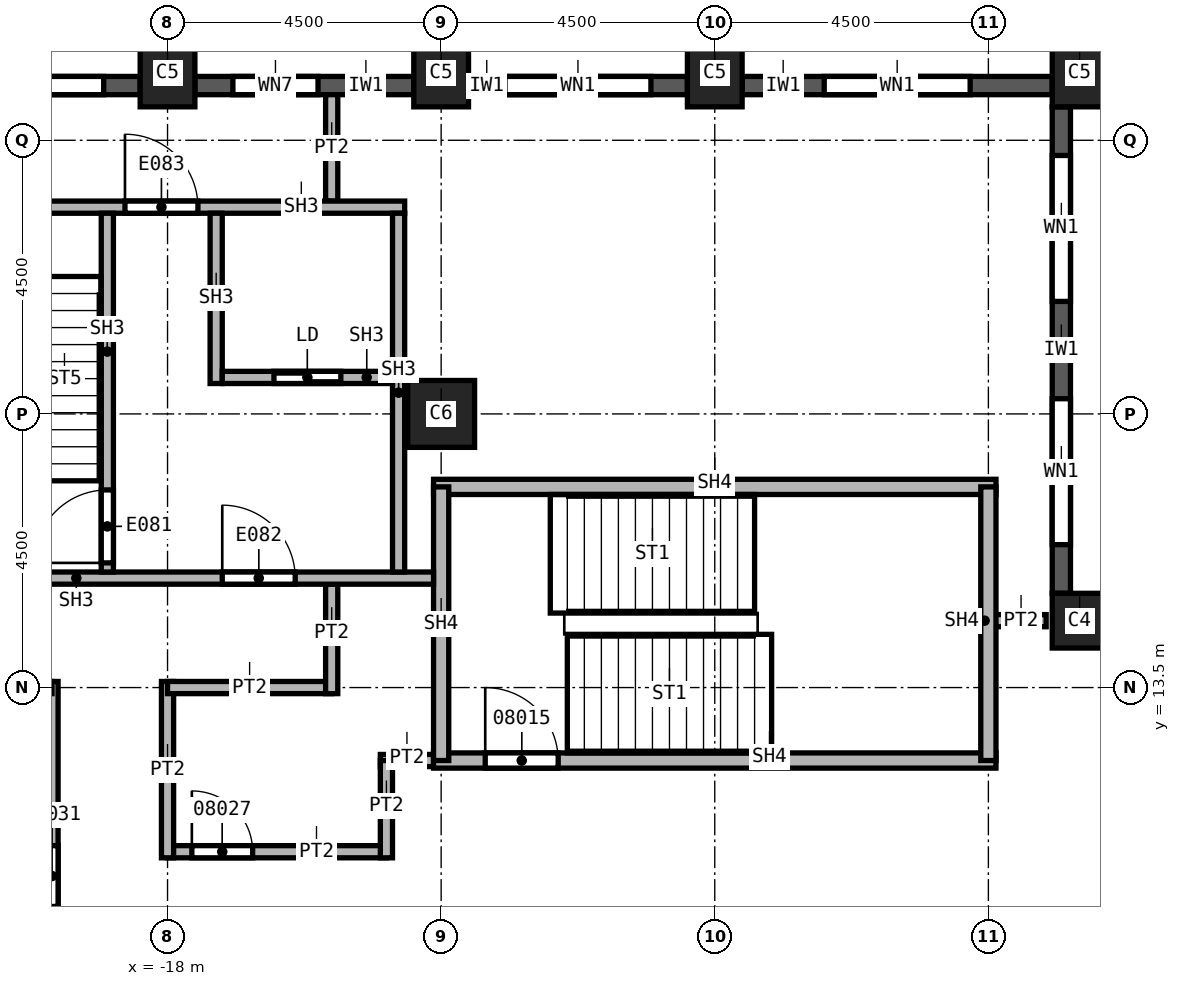
"""IFC4 building model, lengths in metres.
Left out: names, types, materials, properties, quantities, classifications, styles, units other than length and angle.
Written with IfcOpenShell. Run it as: python <this file> out.ifc"""

import sys

from ifc_helpers import new_model, si_unit, direction, frame, frame_2d, origin, origin_2d, place, context, subcontext, project, spatial, rectangle, extrude, element, fill, save


model = new_model("IFC4")
c1 = context("Model", 3, precision=1e-05, world=origin(), true_north=direction((0.0, 1.0)))
c2 = subcontext(c1, "Body", "Model", "MODEL_VIEW")
j1 = project(units=[si_unit("LENGTHUNIT", "METRE"), si_unit("PLANEANGLEUNIT", "RADIAN")], contexts=[c1])
p1 = place(None, origin())
s1 = spatial("IfcSite", under=j1, at=p1, CompositionType="ELEMENT")
p2 = place(p1, origin())
s2 = spatial("IfcBuilding", under=s1, at=p2, CompositionType="ELEMENT")
p3 = place(p2, frame((0.0, 0.0, 150.0)))
s3 = spatial("IfcBuildingStorey", under=s2, at=p3, CompositionType="ELEMENT", Elevation=150.0)
p4 = place(p3, frame((-13.5, 18.0, 0.0), z_axis=(0.0, 0.0, 1.0), x_axis=(1.0, 0.0, 0.0)))
e1 = element("IfcColumn", 1, at=p4, inside=s3, PredefinedType="COLUMN", context=c2, shape_type="SweptSolid", body=[
    extrude(rectangle(XDim=1.1, YDim=1.1, at=origin_2d()), origin(), (0.0, 0.0, 1.0), 3.7),
])
for number, where, z_axis, x_axis in (
    (2, (-3.0, 23.6, 0.0), (0.0, 0.0, 1.0), (1.0, 0.0, 0.0)),
    (3, (-9.0, 23.6, 0.0), (0.0, 0.0, 1.0), (1.0, 0.0, 0.0)),
    (4, (-13.5, 23.6, 0.0), (0.0, 0.0, 1.0), (1.0, 0.0, 0.0)),
    (5, (-18.0, 23.6, 0.0), (0.0, 0.0, 1.0), (1.0, 0.0, 0.0)),
):
    element("IfcColumn", number, at=place(p3, frame(where, z_axis=z_axis, x_axis=x_axis)), inside=s3, PredefinedType="COLUMN", context=c2, shape_type="SweptSolid", body=[
        extrude(rectangle(XDim=0.9, YDim=1.1, at=origin_2d()), origin(), (0.0, 0.0, 1.0), 3.7),
    ])
p5 = place(p3, frame((-3.0, 14.6, 0.0), z_axis=(0.0, 0.0, 1.0), x_axis=(1.0, 0.0, 0.0)))
e6 = element("IfcColumn", 6, at=p5, inside=s3, PredefinedType="COLUMN", context=c2, shape_type="SweptSolid", body=[
    extrude(rectangle(XDim=0.9, YDim=0.9, at=origin_2d()), origin(), (0.0, 0.0, 1.0), 3.7),
])
p6 = place(p3, frame((-3.3, 15.05, 0.0), z_axis=(0.0, 0.0, 1.0), x_axis=(0.0, 1.0, 0.0)))
e7 = element("IfcWall", 7, at=p6, inside=s3, PredefinedType="SOLIDWALL", context=c2, shape_type="SweptSolid", body=[
    extrude(rectangle(XDim=8.0, YDim=0.3, at=frame_2d((4.0, 0.0))), origin(), (0.0, 0.0, 1.0), 3.1),
])
p7 = place(p6, frame((0.8, 0.0, 0.8)))
e8 = element("IfcOpeningElement", 8, at=p7, cuts=e7, PredefinedType="OPENING", context=c2, shape_type="SweptSolid", body=[
    extrude(rectangle(XDim=2.4, YDim=1.95, at=frame_2d((1.2, 0.975))), frame((0.0, 0.15, 0.0), z_axis=(0.0, -1.0, 0.0), x_axis=(1.0, 0.0, 0.0)), (0.0, 0.0, 1.0), 0.3),
])
p8 = place(p6, frame((4.8, 0.0, 0.8)))
e9 = element("IfcOpeningElement", 9, at=p8, cuts=e7, PredefinedType="OPENING", context=c2, shape_type="SweptSolid", body=[
    extrude(rectangle(XDim=2.4, YDim=1.95, at=frame_2d((1.2, 0.975))), frame((0.0, 0.15, 0.0), z_axis=(0.0, -1.0, 0.0), x_axis=(1.0, 0.0, 0.0)), (0.0, 0.0, 1.0), 0.3),
])
p9 = place(p3, frame((-3.45, 23.4, 0.0), z_axis=(0.0, 0.0, 1.0), x_axis=(-1.0, 0.0, 0.0)))
e10 = element("IfcWall", 10, at=p9, inside=s3, PredefinedType="SOLIDWALL", context=c2, shape_type="SweptSolid", body=[
    extrude(rectangle(XDim=5.1, YDim=0.3, at=frame_2d((2.55, 0.0))), origin(), (0.0, 0.0, 1.0), 3.1),
])
p10 = place(p9, frame((1.35, 0.0, 0.8)))
e11 = element("IfcOpeningElement", 11, at=p10, cuts=e10, PredefinedType="OPENING", context=c2, shape_type="SweptSolid", body=[
    extrude(rectangle(XDim=2.4, YDim=1.95, at=frame_2d((1.2, 0.975))), frame((0.0, 0.15, 0.0), z_axis=(0.0, -1.0, 0.0), x_axis=(1.0, 0.0, 0.0)), (0.0, 0.0, 1.0), 0.3),
])
p11 = place(p3, frame((-9.45, 23.4, 0.0), z_axis=(0.0, 0.0, 1.0), x_axis=(-1.0, 0.0, 0.0)))
e12 = element("IfcWall", 12, at=p11, inside=s3, PredefinedType="SOLIDWALL", context=c2, shape_type="SweptSolid", body=[
    extrude(rectangle(XDim=3.6, YDim=0.3, at=frame_2d((1.8, 0.0))), origin(), (0.0, 0.0, 1.0), 3.1),
])
p12 = place(p11, frame((0.6, 0.0, 0.8)))
e13 = element("IfcOpeningElement", 13, at=p12, cuts=e12, PredefinedType="OPENING", context=c2, shape_type="SweptSolid", body=[
    extrude(rectangle(XDim=2.4, YDim=1.95, at=frame_2d((1.2, 0.975))), frame((0.0, 0.15, 0.0), z_axis=(0.0, -1.0, 0.0), x_axis=(1.0, 0.0, 0.0)), (0.0, 0.0, 1.0), 0.3),
])
p13 = place(p3, frame((-13.95, 23.4, 0.0), z_axis=(0.0, 0.0, 1.0), x_axis=(-1.0, 0.0, 0.0)))
e14 = element("IfcWall", 14, at=p13, inside=s3, PredefinedType="SOLIDWALL", context=c2, shape_type="SweptSolid", body=[
    extrude(rectangle(XDim=3.6, YDim=0.3, at=frame_2d((1.8, 0.0))), origin(), (0.0, 0.0, 1.0), 3.1),
])
p14 = place(p13, frame((1.575, 0.0, 0.8)))
e15 = element("IfcOpeningElement", 15, at=p14, cuts=e14, PredefinedType="OPENING", context=c2, shape_type="SweptSolid", body=[
    extrude(rectangle(XDim=1.4, YDim=1.95, at=frame_2d((0.7, 0.975))), frame((0.0, 0.15, 0.0), z_axis=(0.0, -1.0, 0.0), x_axis=(1.0, 0.0, 0.0)), (0.0, 0.0, 1.0), 0.3),
])
p15 = place(p3, frame((-18.45, 23.4, 0.0), z_axis=(0.0, 0.0, 1.0), x_axis=(-1.0, 0.0, 0.0)))
e16 = element("IfcWall", 16, at=p15, inside=s3, PredefinedType="SOLIDWALL", context=c2, shape_type="SweptSolid", body=[
    extrude(rectangle(XDim=3.6, YDim=0.3, at=frame_2d((1.8, 0.0))), origin(), (0.0, 0.0, 1.0), 3.1),
])
p16 = place(p15, frame((0.6, 0.0, 0.8)))
e17 = element("IfcOpeningElement", 17, at=p16, cuts=e16, PredefinedType="OPENING", context=c2, shape_type="SweptSolid", body=[
    extrude(rectangle(XDim=2.4, YDim=1.95, at=frame_2d((1.2, 0.975))), frame((0.0, 0.15, 0.0), z_axis=(0.0, -1.0, 0.0), x_axis=(1.0, 0.0, 0.0)), (0.0, 0.0, 1.0), 0.3),
])
p17 = place(p3, frame((-19.9, 3.65, 0.0), z_axis=(0.0, 0.0, 1.0), x_axis=(0.0, 1.0, 0.0)))
e18 = element("IfcWall", 18, at=p17, inside=s3, PredefinedType="PARTITIONING", context=c2, shape_type="SweptSolid", body=[
    extrude(rectangle(XDim=9.95, YDim=0.2, at=frame_2d((4.975, 0.0))), origin(), (0.0, 0.0, 1.0), 3.7),
])
p18 = place(p17, frame((6.25, 0.0, 0.0)))
e19 = element("IfcOpeningElement", 19, at=p18, cuts=e18, PredefinedType="OPENING", context=c2, shape_type="SweptSolid", body=[
    extrude(rectangle(XDim=1.0, YDim=2.1, at=frame_2d((0.5, 1.05))), frame((0.0, 0.1, 0.0), z_axis=(0.0, -1.0, 0.0), x_axis=(1.0, 0.0, 0.0)), (0.0, 0.0, 1.0), 0.2),
])
p19 = place(p3, frame((-18.0, 10.8, 0.0), z_axis=(0.0, 0.0, 1.0), x_axis=(1.0, 0.0, 0.0)))
e20 = element("IfcWall", 20, at=p19, inside=s3, PredefinedType="PARTITIONING", context=c2, shape_type="SweptSolid", body=[
    extrude(rectangle(XDim=3.6, YDim=0.2, at=frame_2d((1.8, 0.0))), origin(), (0.0, 0.0, 1.0), 3.7),
])
p20 = place(p19, frame((0.4, 0.0, 0.0)))
e21 = element("IfcOpeningElement", 21, at=p20, cuts=e20, PredefinedType="OPENING", context=c2, shape_type="SweptSolid", body=[
    extrude(rectangle(XDim=1.0, YDim=2.1, at=frame_2d((0.5, 1.05))), frame((0.0, 0.1, 0.0), z_axis=(0.0, -1.0, 0.0), x_axis=(1.0, 0.0, 0.0)), (0.0, 0.0, 1.0), 0.2),
])
p21 = place(p3, frame((-18.0, 13.6, 0.0), z_axis=(0.0, 0.0, 1.0), x_axis=(0.0, -1.0, 0.0)))
e22 = element("IfcWall", 22, at=p21, inside=s3, PredefinedType="PARTITIONING", context=c2, shape_type="SweptSolid", body=[
    extrude(rectangle(XDim=2.9, YDim=0.2, at=frame_2d((1.45, 0.0))), origin(), (0.0, 0.0, 1.0), 3.7),
])
p22 = place(p3, frame((-15.3, 13.5, 0.0), z_axis=(0.0, 0.0, 1.0), x_axis=(-1.0, 0.0, 0.0)))
e23 = element("IfcWall", 23, at=p22, inside=s3, PredefinedType="PARTITIONING", context=c2, shape_type="SweptSolid", body=[
    extrude(rectangle(XDim=2.7, YDim=0.2, at=frame_2d((1.35, 0.0))), origin(), (0.0, 0.0, 1.0), 3.7),
])
p23 = place(p3, frame((-15.3, 15.2, 0.0), z_axis=(0.0, 0.0, 1.0), x_axis=(0.0, -1.0, 0.0)))
e24 = element("IfcWall", 24, at=p23, inside=s3, PredefinedType="PARTITIONING", context=c2, shape_type="SweptSolid", body=[
    extrude(rectangle(XDim=1.8, YDim=0.2, at=frame_2d((0.9, 0.0))), origin(), (0.0, 0.0, 1.0), 3.7),
])
p24 = place(p3, frame((-15.3, 23.25, 0.0), z_axis=(0.0, 0.0, 1.0), x_axis=(0.0, -1.0, 0.0)))
e25 = element("IfcWall", 25, at=p24, inside=s3, PredefinedType="PARTITIONING", context=c2, shape_type="SweptSolid", body=[
    extrude(rectangle(XDim=1.75, YDim=0.2, at=frame_2d((0.875, 0.0))), origin(), (0.0, 0.0, 1.0), 3.7),
])
p25 = place(p3, frame((-14.5, 12.3, 0.0), z_axis=(0.0, 0.0, 1.0), x_axis=(1.0, 0.0, 0.0)))
e26 = element("IfcWall", 26, at=p25, inside=s3, PredefinedType="PARTITIONING", context=c2, shape_type="SweptSolid", body=[
    extrude(rectangle(XDim=1.125, YDim=0.2, at=frame_2d((0.562, 0.0))), origin(), (0.0, 0.0, 1.0), 3.7),
])
p26 = place(p3, frame((-14.4, 10.7, 0.0), z_axis=(0.0, 0.0, 1.0), x_axis=(0.0, 1.0, 0.0)))
e27 = element("IfcWall", 27, at=p26, inside=s3, PredefinedType="PARTITIONING", context=c2, shape_type="SweptSolid", body=[
    extrude(rectangle(XDim=1.6, YDim=0.2, at=frame_2d((0.8, 0.0))), origin(), (0.0, 0.0, 1.0), 3.7),
])
p27 = place(p3, frame((-4.5, 14.6, 0.0), z_axis=(0.0, 0.0, 1.0), x_axis=(1.0, 0.0, 0.0)))
e28 = element("IfcWall", 28, at=p27, inside=s3, PredefinedType="PARTITIONING", context=c2, shape_type="SweptSolid", body=[
    extrude(rectangle(XDim=0.95, YDim=0.2, at=frame_2d((0.475, 0.0))), origin(), (0.0, 0.0, 1.0), 3.7),
])
p28 = place(p3, frame((-13.625, 12.3, 0.0), z_axis=(0.0, 0.0, 1.0), x_axis=(1.0, 0.0, 0.0)))
e29 = element("IfcWall", 29, at=p28, inside=s3, PredefinedType="SOLIDWALL", context=c2, shape_type="SweptSolid", body=[
    extrude(rectangle(XDim=9.25, YDim=0.25, at=frame_2d((4.625, 0.0))), origin(), (0.0, 0.0, 1.0), 3.7),
])
p29 = place(p28, frame((0.85, 0.0, 0.0)))
e30 = element("IfcOpeningElement", 30, at=p29, cuts=e29, PredefinedType="OPENING", context=c2, shape_type="SweptSolid", body=[
    extrude(rectangle(XDim=1.2, YDim=2.1, at=frame_2d((0.6, 1.05))), frame((0.0, 0.125, 0.0), z_axis=(0.0, -1.0, 0.0), x_axis=(1.0, 0.0, 0.0)), (0.0, 0.0, 1.0), 0.25),
])
p30 = place(p3, frame((-13.625, 16.8, 0.0), z_axis=(0.0, 0.0, 1.0), x_axis=(1.0, 0.0, 0.0)))
e31 = element("IfcWall", 31, at=p30, inside=s3, PredefinedType="SOLIDWALL", context=c2, shape_type="SweptSolid", body=[
    extrude(rectangle(XDim=9.25, YDim=0.25, at=frame_2d((4.625, 0.0))), origin(), (0.0, 0.0, 1.0), 3.7),
])
for number, where, z_axis, x_axis in (
    (32, (-13.5, 12.3, 0.0), (0.0, 0.0, 1.0), (0.0, 1.0, 0.0)),
    (33, (-4.5, 16.8, 0.0), (0.0, 0.0, 1.0), (0.0, -1.0, 0.0)),
):
    element("IfcWall", number, at=place(p3, frame(where, z_axis=z_axis, x_axis=x_axis)), inside=s3, PredefinedType="SOLIDWALL", context=c2, shape_type="SweptSolid", body=[
        extrude(rectangle(XDim=4.5, YDim=0.25, at=frame_2d((2.25, 0.0))), origin(), (0.0, 0.0, 1.0), 3.7),
    ])
p31 = place(p3, frame((-21.9, 15.3, 0.0), z_axis=(0.0, 0.0, 1.0), x_axis=(1.0, 0.0, 0.0)))
e34 = element("IfcWall", 34, at=p31, inside=s3, PredefinedType="SOLIDWALL", context=c2, shape_type="SweptSolid", body=[
    extrude(rectangle(XDim=8.275, YDim=0.2, at=frame_2d((4.137, 0.0))), origin(), (0.0, 0.0, 1.0), 3.7),
])
p32 = place(p31, frame((4.8, 0.0, 0.0)))
e35 = element("IfcOpeningElement", 35, at=p32, cuts=e34, PredefinedType="OPENING", context=c2, shape_type="SweptSolid", body=[
    extrude(rectangle(XDim=1.2, YDim=2.1, at=frame_2d((0.6, 1.05))), frame((0.0, 0.1, 0.0), z_axis=(0.0, -1.0, 0.0), x_axis=(1.0, 0.0, 0.0)), (0.0, 0.0, 1.0), 0.2),
])
p33 = place(p3, frame((-21.9, 21.4, 0.0), z_axis=(0.0, 0.0, 1.0), x_axis=(1.0, 0.0, 0.0)))
e36 = element("IfcWall", 36, at=p33, inside=s3, PredefinedType="SOLIDWALL", context=c2, shape_type="SweptSolid", body=[
    extrude(rectangle(XDim=7.8, YDim=0.2, at=frame_2d((3.9, 0.0))), origin(), (0.0, 0.0, 1.0), 3.7),
])
p34 = place(p33, frame((3.2, 0.0, 0.0)))
e37 = element("IfcOpeningElement", 37, at=p34, cuts=e36, PredefinedType="OPENING", context=c2, shape_type="SweptSolid", body=[
    extrude(rectangle(XDim=1.2, YDim=2.1, at=frame_2d((0.6, 1.05))), frame((0.0, 0.1, 0.0), z_axis=(0.0, -1.0, 0.0), x_axis=(1.0, 0.0, 0.0)), (0.0, 0.0, 1.0), 0.2),
])
p35 = place(p3, frame((-14.2, 15.4, 0.0), z_axis=(0.0, 0.0, 1.0), x_axis=(0.0, 1.0, 0.0)))
e38 = element("IfcWall", 38, at=p35, inside=s3, PredefinedType="SOLIDWALL", context=c2, shape_type="SweptSolid", body=[
    extrude(rectangle(XDim=5.9, YDim=0.2, at=frame_2d((2.95, 0.0))), origin(), (0.0, 0.0, 1.0), 3.7),
])
p36 = place(p3, frame((-18.99, 15.4, 0.0), z_axis=(0.0, 0.0, 1.0), x_axis=(0.0, 1.0, 0.0)))
e39 = element("IfcWall", 39, at=p36, inside=s3, PredefinedType="SOLIDWALL", context=c2, shape_type="SweptSolid", body=[
    extrude(rectangle(XDim=5.9, YDim=0.2, at=frame_2d((2.95, 0.0))), origin(), (0.0, 0.0, 1.0), 3.7),
])
p37 = place(p36, frame((0.15, 0.0, 0.0)))
e40 = element("IfcOpeningElement", 40, at=p37, cuts=e39, PredefinedType="OPENING", context=c2, shape_type="SweptSolid", body=[
    extrude(rectangle(XDim=1.2, YDim=2.1, at=frame_2d((0.6, 1.05))), frame((0.0, 0.1, 0.0), z_axis=(0.0, -1.0, 0.0), x_axis=(1.0, 0.0, 0.0)), (0.0, 0.0, 1.0), 0.2),
])
p38 = place(p3, frame((-17.2, 18.5, 0.0), z_axis=(0.0, 0.0, 1.0), x_axis=(0.0, 1.0, 0.0)))
e41 = element("IfcWall", 41, at=p38, inside=s3, PredefinedType="SOLIDWALL", context=c2, shape_type="SweptSolid", body=[
    extrude(rectangle(XDim=2.8, YDim=0.2, at=frame_2d((1.4, 0.0))), origin(), (0.0, 0.0, 1.0), 3.7),
])
p39 = place(p3, frame((-17.1, 18.6, 0.0), z_axis=(0.0, 0.0, 1.0), x_axis=(1.0, 0.0, 0.0)))
e42 = element("IfcWall", 42, at=p39, inside=s3, PredefinedType="SOLIDWALL", context=c2, shape_type="SweptSolid", body=[
    extrude(rectangle(XDim=2.8, YDim=0.2, at=frame_2d((1.4, 0.0))), origin(), (0.0, 0.0, 1.0), 3.7),
])
p40 = place(p39, frame((0.85, 0.0, 0.0)))
e43 = element("IfcOpeningElement", 43, at=p40, cuts=e42, PredefinedType="OPENING", context=c2, shape_type="SweptSolid", body=[
    extrude(rectangle(XDim=1.1, YDim=2.1, at=frame_2d((0.55, 1.05))), frame((0.0, 0.1, 0.0), z_axis=(0.0, -1.0, 0.0), x_axis=(1.0, 0.0, 0.0)), (0.0, 0.0, 1.0), 0.2),
])
p41 = place(p7, origin())
e44 = element("IfcWindow", 44, at=p41, inside=s3, PartitioningType="SINGLE_PANEL", PredefinedType="WINDOW", context=c2, shape_type="SweptSolid", body=[
    extrude(rectangle(XDim=2.4, YDim=1.95, at=frame_2d((1.2, 0.975))), frame((0.0, 0.03, 0.0), z_axis=(0.0, -1.0, 0.0), x_axis=(1.0, 0.0, 0.0)), (0.0, 0.0, 1.0), 0.06),
])
fill(e8, e44)
p42 = place(p8, origin())
e45 = element("IfcWindow", 45, at=p42, inside=s3, PartitioningType="SINGLE_PANEL", PredefinedType="WINDOW", context=c2, shape_type="SweptSolid", body=[
    extrude(rectangle(XDim=2.4, YDim=1.95, at=frame_2d((1.2, 0.975))), frame((0.0, 0.03, 0.0), z_axis=(0.0, -1.0, 0.0), x_axis=(1.0, 0.0, 0.0)), (0.0, 0.0, 1.0), 0.06),
])
fill(e9, e45)
p43 = place(p10, origin())
e46 = element("IfcWindow", 46, at=p43, inside=s3, PartitioningType="SINGLE_PANEL", PredefinedType="WINDOW", context=c2, shape_type="SweptSolid", body=[
    extrude(rectangle(XDim=2.4, YDim=1.95, at=frame_2d((1.2, 0.975))), frame((0.0, 0.03, 0.0), z_axis=(0.0, -1.0, 0.0), x_axis=(1.0, 0.0, 0.0)), (0.0, 0.0, 1.0), 0.06),
])
fill(e11, e46)
p44 = place(p12, origin())
e47 = element("IfcWindow", 47, at=p44, inside=s3, PartitioningType="SINGLE_PANEL", PredefinedType="WINDOW", context=c2, shape_type="SweptSolid", body=[
    extrude(rectangle(XDim=2.4, YDim=1.95, at=frame_2d((1.2, 0.975))), frame((0.0, 0.03, 0.0), z_axis=(0.0, -1.0, 0.0), x_axis=(1.0, 0.0, 0.0)), (0.0, 0.0, 1.0), 0.06),
])
fill(e13, e47)
p45 = place(p16, origin())
e48 = element("IfcWindow", 48, at=p45, inside=s3, PartitioningType="SINGLE_PANEL", PredefinedType="WINDOW", context=c2, shape_type="SweptSolid", body=[
    extrude(rectangle(XDim=2.4, YDim=1.95, at=frame_2d((1.2, 0.975))), frame((0.0, 0.03, 0.0), z_axis=(0.0, -1.0, 0.0), x_axis=(1.0, 0.0, 0.0)), (0.0, 0.0, 1.0), 0.06),
])
fill(e17, e48)
p46 = place(p29, origin())
e49 = element("IfcDoor", 49, at=p46, inside=s3, OperationType="SINGLE_SWING_RIGHT", PredefinedType="DOOR", context=c2, shape_type="SweptSolid", body=[
    extrude(rectangle(XDim=1.2, YDim=2.1, at=frame_2d((0.6, 1.05))), frame((0.0, 0.025, 0.0), z_axis=(0.0, -1.0, 0.0), x_axis=(1.0, 0.0, 0.0)), (0.0, 0.0, 1.0), 0.05),
])
fill(e30, e49)
p47 = place(p20, origin())
e50 = element("IfcDoor", 50, at=p47, inside=s3, OperationType="SINGLE_SWING_RIGHT", PredefinedType="DOOR", context=c2, shape_type="SweptSolid", body=[
    extrude(rectangle(XDim=1.0, YDim=2.1, at=frame_2d((0.5, 1.05))), frame((0.0, 0.025, 0.0), z_axis=(0.0, -1.0, 0.0), x_axis=(1.0, 0.0, 0.0)), (0.0, 0.0, 1.0), 0.05),
])
fill(e21, e50)
p48 = place(p18, origin())
e51 = element("IfcDoor", 51, at=p48, inside=s3, OperationType="SINGLE_SWING_RIGHT", PredefinedType="DOOR", context=c2, shape_type="SweptSolid", body=[
    extrude(rectangle(XDim=1.0, YDim=2.1, at=frame_2d((0.5, 1.05))), frame((0.0, 0.025, 0.0), z_axis=(0.0, -1.0, 0.0), x_axis=(1.0, 0.0, 0.0)), (0.0, 0.0, 1.0), 0.05),
])
fill(e19, e51)
p49 = place(p37, origin())
e52 = element("IfcDoor", 52, at=p49, inside=s3, OperationType="SINGLE_SWING_LEFT", PredefinedType="DOOR", context=c2, shape_type="SweptSolid", body=[
    extrude(rectangle(XDim=1.2, YDim=2.1, at=frame_2d((0.6, 1.05))), frame((0.0, 0.025, 0.0), z_axis=(0.0, -1.0, 0.0), x_axis=(1.0, 0.0, 0.0)), (0.0, 0.0, 1.0), 0.05),
])
fill(e40, e52)
p50 = place(p40, origin())
e53 = element("IfcDoor", 53, at=p50, inside=s3, OperationType="SLIDING_TO_LEFT", PredefinedType="DOOR", context=c2, shape_type="SweptSolid", body=[
    extrude(rectangle(XDim=1.1, YDim=2.1, at=frame_2d((0.55, 1.05))), frame((0.0, 0.025, 0.0), z_axis=(0.0, -1.0, 0.0), x_axis=(1.0, 0.0, 0.0)), (0.0, 0.0, 1.0), 0.05),
])
fill(e43, e53)
p51 = place(p32, origin())
e54 = element("IfcDoor", 54, at=p51, inside=s3, OperationType="SINGLE_SWING_RIGHT", PredefinedType="DOOR", context=c2, shape_type="SweptSolid", body=[
    extrude(rectangle(XDim=1.2, YDim=2.1, at=frame_2d((0.6, 1.05))), frame((0.0, 0.025, 0.0), z_axis=(0.0, -1.0, 0.0), x_axis=(1.0, 0.0, 0.0)), (0.0, 0.0, 1.0), 0.05),
])
fill(e35, e54)
p52 = place(p34, origin())
e55 = element("IfcDoor", 55, at=p52, inside=s3, OperationType="SINGLE_SWING_LEFT", PredefinedType="DOOR", context=c2, shape_type="SweptSolid", body=[
    extrude(rectangle(XDim=1.2, YDim=2.1, at=frame_2d((0.6, 1.05))), frame((0.0, 0.025, 0.0), z_axis=(0.0, -1.0, 0.0), x_axis=(1.0, 0.0, 0.0)), (0.0, 0.0, 1.0), 0.05),
])
fill(e37, e55)
p53 = place(p14, origin())
e56 = element("IfcWindow", 56, at=p53, inside=s3, PartitioningType="SINGLE_PANEL", PredefinedType="WINDOW", context=c2, shape_type="SweptSolid", body=[
    extrude(rectangle(XDim=1.4, YDim=1.95, at=frame_2d((0.7, 0.975))), frame((0.0, 0.03, 0.0), z_axis=(0.0, -1.0, 0.0), x_axis=(1.0, 0.0, 0.0)), (0.0, 0.0, 1.0), 0.06),
])
fill(e15, e56)
save(model, sys.argv[1])
